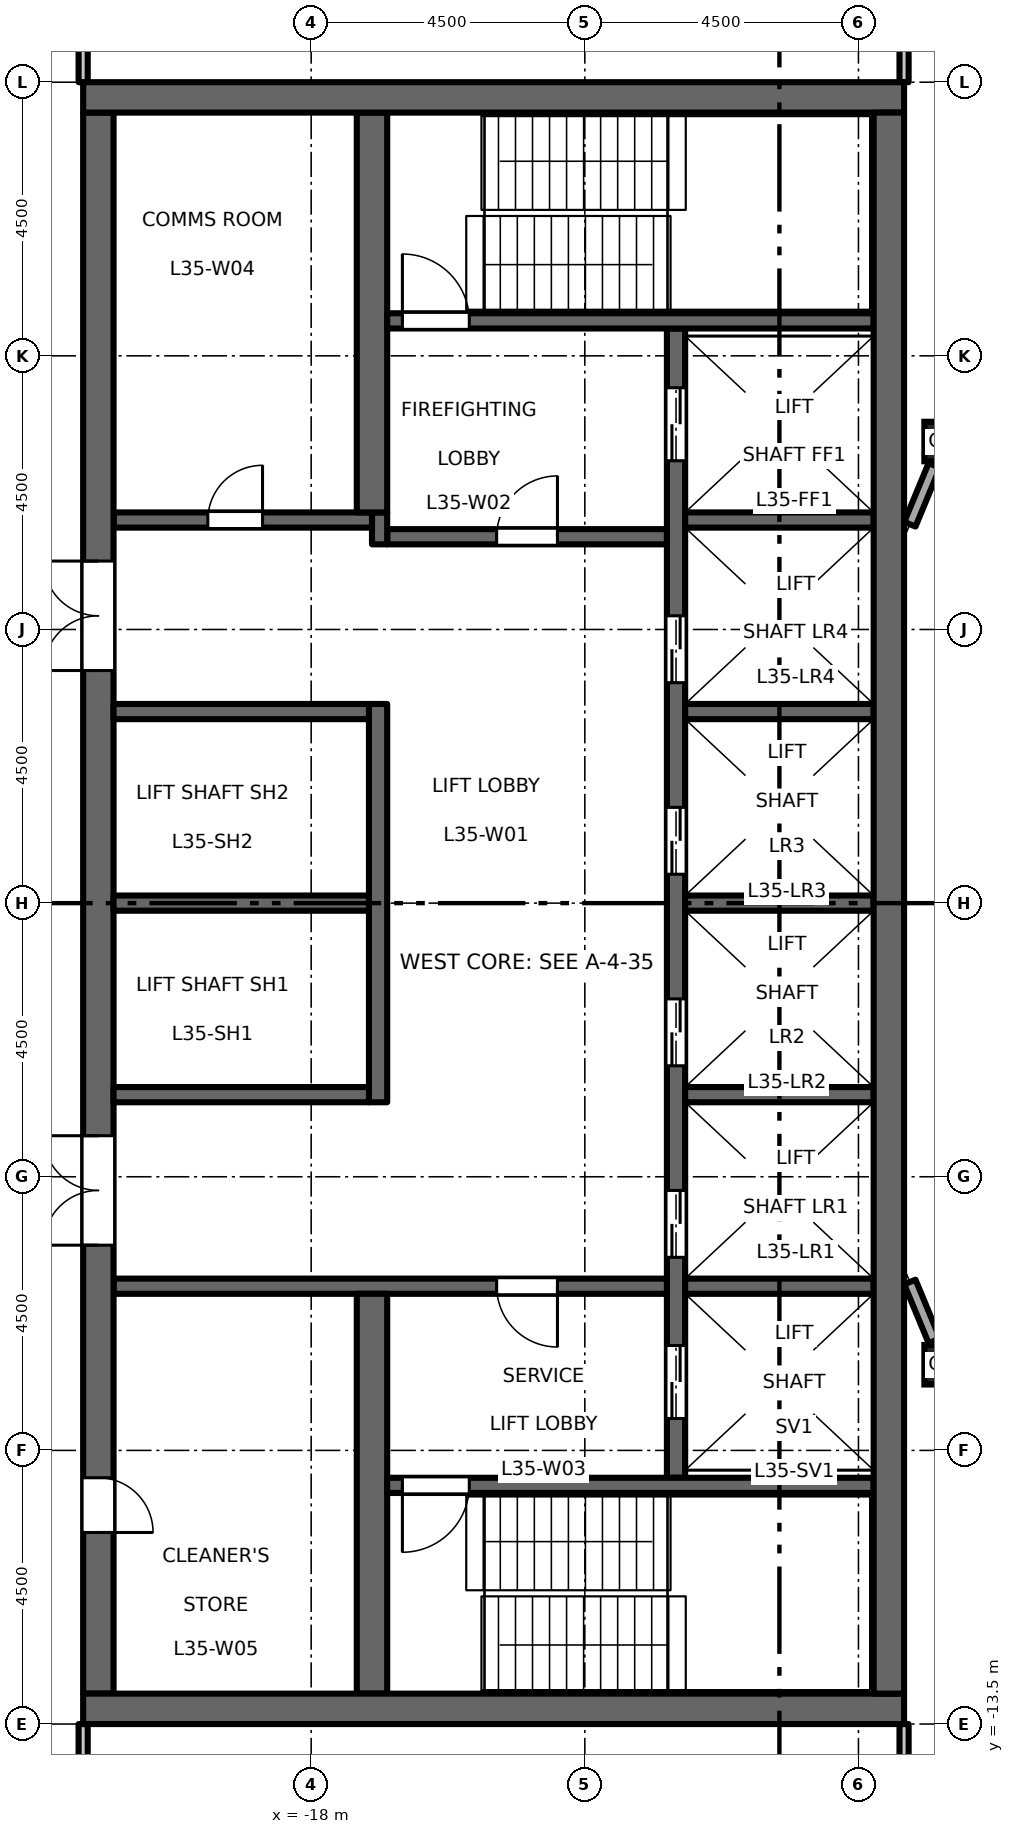
"""IFC4 building model, lengths in metres.
Left out: names, types, materials, properties, quantities, classifications, styles, units other than length and angle.
Written with IfcOpenShell. Run it as: python <this file> out.ifc"""

import sys

from ifc_helpers import new_model, si_unit, direction, frame, frame_2d, origin, origin_2d, place, context, subcontext, project, spatial, rectangle, hollow_rectangle, extrude, element, fill, save


model = new_model("IFC4")
c1 = context("Model", 3, precision=1e-05, world=origin(), true_north=direction((0.0, 1.0)))
c2 = subcontext(c1, "Body", "Model", "MODEL_VIEW")
j1 = project(units=[si_unit("LENGTHUNIT", "METRE"), si_unit("PLANEANGLEUNIT", "RADIAN")], contexts=[c1])
p1 = place(None, origin())
s1 = spatial("IfcSite", under=j1, at=p1, CompositionType="ELEMENT")
p2 = place(p1, origin())
s2 = spatial("IfcBuilding", under=s1, at=p2, CompositionType="ELEMENT")
p3 = place(p2, frame((0.0, 0.0, 163.2)))
s3 = spatial("IfcBuildingStorey", under=s2, at=p3, CompositionType="ELEMENT", Elevation=163.2)
for number, where, z_axis, x_axis in (
    (1, (-7.591, -7.591, 0.0), (0.0, 0.0, 1.0), (1.0, 0.0, 0.0)),
    (2, (-7.591, 7.591, 0.0), (0.0, 0.0, 1.0), (1.0, 0.0, 0.0)),
):
    element("IfcColumn", number, at=place(p3, frame(where, z_axis=z_axis, x_axis=x_axis)), inside=s3, PredefinedType="COLUMN", context=c2, shape_type="SweptSolid", body=[
        extrude(hollow_rectangle(XDim=0.65, YDim=0.65, WallThickness=0.036, at=origin_2d()), origin(), (0.0, 0.0, 1.0), 4.5),
    ])
p4 = place(p3, frame((-12.0, -9.45, 0.0), z_axis=(0.0, 0.0, 1.0), x_axis=(0.0, 1.0, 0.0)))
e3 = element("IfcWall", 3, at=p4, inside=s3, PredefinedType="SHEAR", context=c2, shape_type="SweptSolid", body=[
    extrude(rectangle(XDim=18.9, YDim=0.3, at=frame_2d((9.45, 0.0))), origin(), (0.0, 0.0, 1.0), 4.35),
])
p5 = place(p4, frame((3.625, 0.0, 0.0)))
e4 = element("IfcOpeningElement", 4, at=p5, cuts=e3, PredefinedType="OPENING", context=c2, shape_type="SweptSolid", body=[
    extrude(rectangle(XDim=1.1, YDim=2.1, at=frame_2d((0.55, 1.05))), frame((0.0, 0.16, 0.0), z_axis=(0.0, -1.0, 0.0), x_axis=(1.0, 0.0, 0.0)), (0.0, 0.0, 1.0), 0.32),
])
p6 = place(p4, frame((6.775, 0.0, 0.0)))
e5 = element("IfcOpeningElement", 5, at=p6, cuts=e3, PredefinedType="OPENING", context=c2, shape_type="SweptSolid", body=[
    extrude(rectangle(XDim=1.1, YDim=2.1, at=frame_2d((0.55, 1.05))), frame((0.0, 0.16, 0.0), z_axis=(0.0, -1.0, 0.0), x_axis=(1.0, 0.0, 0.0)), (0.0, 0.0, 1.0), 0.32),
])
p7 = place(p4, frame((9.925, 0.0, 0.0)))
e6 = element("IfcOpeningElement", 6, at=p7, cuts=e3, PredefinedType="OPENING", context=c2, shape_type="SweptSolid", body=[
    extrude(rectangle(XDim=1.1, YDim=2.1, at=frame_2d((0.55, 1.05))), frame((0.0, 0.16, 0.0), z_axis=(0.0, -1.0, 0.0), x_axis=(1.0, 0.0, 0.0)), (0.0, 0.0, 1.0), 0.32),
])
p8 = place(p4, frame((13.075, 0.0, 0.0)))
e7 = element("IfcOpeningElement", 7, at=p8, cuts=e3, PredefinedType="OPENING", context=c2, shape_type="SweptSolid", body=[
    extrude(rectangle(XDim=1.1, YDim=2.1, at=frame_2d((0.55, 1.05))), frame((0.0, 0.16, 0.0), z_axis=(0.0, -1.0, 0.0), x_axis=(1.0, 0.0, 0.0)), (0.0, 0.0, 1.0), 0.32),
])
p9 = place(p4, frame((16.725, 0.0, 0.0)))
e8 = element("IfcOpeningElement", 8, at=p9, cuts=e3, PredefinedType="OPENING", context=c2, shape_type="SweptSolid", body=[
    extrude(rectangle(XDim=1.2, YDim=2.1, at=frame_2d((0.6, 1.05))), frame((0.0, 0.16, 0.0), z_axis=(0.0, -1.0, 0.0), x_axis=(1.0, 0.0, 0.0)), (0.0, 0.0, 1.0), 0.32),
])
p10 = place(p4, frame((0.975, 0.0, 0.0)))
e9 = element("IfcOpeningElement", 9, at=p10, cuts=e3, PredefinedType="OPENING", context=c2, shape_type="SweptSolid", body=[
    extrude(rectangle(XDim=1.2, YDim=2.1, at=frame_2d((0.6, 1.05))), frame((0.0, 0.16, 0.0), z_axis=(0.0, -1.0, 0.0), x_axis=(1.0, 0.0, 0.0)), (0.0, 0.0, 1.0), 0.32),
])
p11 = place(p3, frame((-12.15, 6.025, 0.0), z_axis=(0.0, 0.0, 1.0), x_axis=(-1.0, 0.0, 0.0)))
e10 = element("IfcWall", 10, at=p11, inside=s3, PredefinedType="SHEAR", context=c2, shape_type="SweptSolid", body=[
    extrude(rectangle(XDim=4.6, YDim=0.25, at=frame_2d((2.3, 0.0))), origin(), (0.0, 0.0, 1.0), 4.35),
])
p12 = place(p11, frame((1.8, 0.0, 0.0)))
e11 = element("IfcOpeningElement", 11, at=p12, cuts=e10, PredefinedType="OPENING", context=c2, shape_type="SweptSolid", body=[
    extrude(rectangle(XDim=1.0, YDim=2.1, at=frame_2d((0.5, 1.05))), frame((0.0, 0.135, 0.0), z_axis=(0.0, -1.0, 0.0), x_axis=(1.0, 0.0, 0.0)), (0.0, 0.0, 1.0), 0.27),
])
p13 = place(p3, frame((-16.875, 5.9, 0.0), z_axis=(0.0, 0.0, 1.0), x_axis=(0.0, 1.0, 0.0)))
e12 = element("IfcWall", 12, at=p13, inside=s3, PredefinedType="SHEAR", context=c2, shape_type="SweptSolid", body=[
    extrude(rectangle(XDim=0.525, YDim=0.25, at=frame_2d((0.263, 0.0))), origin(), (0.0, 0.0, 1.0), 4.35),
])
p14 = place(p3, frame((-17.0, 6.3, 0.0), z_axis=(0.0, 0.0, 1.0), x_axis=(-1.0, 0.0, 0.0)))
e13 = element("IfcWall", 13, at=p14, inside=s3, PredefinedType="SHEAR", context=c2, shape_type="SweptSolid", body=[
    extrude(rectangle(XDim=4.25, YDim=0.25, at=frame_2d((2.125, 0.0))), origin(), (0.0, 0.0, 1.0), 4.35),
])
p15 = place(p14, frame((1.8, 0.0, 0.0)))
e14 = element("IfcOpeningElement", 14, at=p15, cuts=e13, PredefinedType="OPENING", context=c2, shape_type="SweptSolid", body=[
    extrude(rectangle(XDim=0.9, YDim=2.1, at=frame_2d((0.45, 1.05))), frame((0.0, 0.135, 0.0), z_axis=(0.0, -1.0, 0.0), x_axis=(1.0, 0.0, 0.0)), (0.0, 0.0, 1.0), 0.27),
])
p16 = place(p3, frame((-12.15, -6.3, 0.0), z_axis=(0.0, 0.0, 1.0), x_axis=(-1.0, 0.0, 0.0)))
e15 = element("IfcWall", 15, at=p16, inside=s3, PredefinedType="SHEAR", context=c2, shape_type="SweptSolid", body=[
    extrude(rectangle(XDim=9.1, YDim=0.25, at=frame_2d((4.55, 0.0))), origin(), (0.0, 0.0, 1.0), 4.35),
])
p17 = place(p16, frame((1.8, 0.0, 0.0)))
e16 = element("IfcOpeningElement", 16, at=p17, cuts=e15, PredefinedType="OPENING", context=c2, shape_type="SweptSolid", body=[
    extrude(rectangle(XDim=1.0, YDim=2.1, at=frame_2d((0.5, 1.05))), frame((0.0, 0.135, 0.0), z_axis=(0.0, -1.0, 0.0), x_axis=(1.0, 0.0, 0.0)), (0.0, 0.0, 1.0), 0.27),
])
p18 = place(p3, frame((-21.5, -13.0, 0.0), z_axis=(0.0, 0.0, 1.0), x_axis=(0.0, 1.0, 0.0)))
e17 = element("IfcWall", 17, at=p18, inside=s3, PredefinedType="SHEAR", context=c2, shape_type="SweptSolid", body=[
    extrude(rectangle(XDim=26.0, YDim=0.5, at=frame_2d((13.0, 0.0))), origin(), (0.0, 0.0, 1.0), 4.35),
])
p19 = place(p18, frame((16.825, 0.0, 0.0)))
e18 = element("IfcOpeningElement", 18, at=p19, cuts=e17, PredefinedType="OPENING", context=c2, shape_type="SweptSolid", body=[
    extrude(rectangle(XDim=1.8, YDim=2.1, at=frame_2d((0.9, 1.05))), frame((0.0, 0.26, 0.0), z_axis=(0.0, -1.0, 0.0), x_axis=(1.0, 0.0, 0.0)), (0.0, 0.0, 1.0), 0.52),
])
p20 = place(p18, frame((7.375, 0.0, 0.0)))
e19 = element("IfcOpeningElement", 19, at=p20, cuts=e17, PredefinedType="OPENING", context=c2, shape_type="SweptSolid", body=[
    extrude(rectangle(XDim=1.8, YDim=2.1, at=frame_2d((0.9, 1.05))), frame((0.0, 0.26, 0.0), z_axis=(0.0, -1.0, 0.0), x_axis=(1.0, 0.0, 0.0)), (0.0, 0.0, 1.0), 0.52),
])
p21 = place(p18, frame((2.65, 0.0, 0.0)))
e20 = element("IfcOpeningElement", 20, at=p21, cuts=e17, PredefinedType="OPENING", context=c2, shape_type="SweptSolid", body=[
    extrude(rectangle(XDim=0.9, YDim=2.1, at=frame_2d((0.45, 1.05))), frame((0.0, 0.26, 0.0), z_axis=(0.0, -1.0, 0.0), x_axis=(1.0, 0.0, 0.0)), (0.0, 0.0, 1.0), 0.52),
])
p22 = place(p3, frame((-16.9, -3.275, 0.0), z_axis=(0.0, 0.0, 1.0), x_axis=(0.0, 1.0, 0.0)))
e21 = element("IfcWall", 21, at=p22, inside=s3, PredefinedType="SHEAR", context=c2, shape_type="SweptSolid", body=[
    extrude(rectangle(XDim=6.55, YDim=0.3, at=frame_2d((3.275, 0.0))), origin(), (0.0, 0.0, 1.0), 4.35),
])
for number, where, z_axis, x_axis in (
    (22, (-17.05, 0.0, 0.0), (0.0, 0.0, 1.0), (-1.0, 0.0, 0.0)),
    (23, (-17.05, 3.15, 0.0), (0.0, 0.0, 1.0), (-1.0, 0.0, 0.0)),
    (24, (-17.05, -3.15, 0.0), (0.0, 0.0, 1.0), (-1.0, 0.0, 0.0)),
):
    element("IfcWall", number, at=place(p3, frame(where, z_axis=z_axis, x_axis=x_axis)), inside=s3, PredefinedType="SHEAR", context=c2, shape_type="SweptSolid", body=[
        extrude(rectangle(XDim=4.2, YDim=0.25, at=frame_2d((2.1, 0.0))), origin(), (0.0, 0.0, 1.0), 4.35),
    ])
for number, where, z_axis, x_axis in (
    (25, (-17.0, 6.425, 0.0), (0.0, 0.0, 1.0), (0.0, 1.0, 0.0)),
    (26, (-17.0, -13.0, 0.0), (0.0, 0.0, 1.0), (0.0, 1.0, 0.0)),
):
    element("IfcWall", number, at=place(p3, frame(where, z_axis=z_axis, x_axis=x_axis)), inside=s3, PredefinedType="SHEAR", context=c2, shape_type="SweptSolid", body=[
        extrude(rectangle(XDim=6.575, YDim=0.5, at=frame_2d((3.288, 0.0))), origin(), (0.0, 0.0, 1.0), 4.35),
    ])
for number, where, z_axis, x_axis in (
    (27, (-8.75, 0.0, 0.0), (0.0, 0.0, 1.0), (-1.0, 0.0, 0.0)),
    (28, (-8.75, 3.15, 0.0), (0.0, 0.0, 1.0), (-1.0, 0.0, 0.0)),
    (29, (-8.75, 6.3, 0.0), (0.0, 0.0, 1.0), (-1.0, 0.0, 0.0)),
    (30, (-8.75, -3.15, 0.0), (0.0, 0.0, 1.0), (-1.0, 0.0, 0.0)),
    (31, (-8.75, -6.3, 0.0), (0.0, 0.0, 1.0), (-1.0, 0.0, 0.0)),
):
    element("IfcWall", number, at=place(p3, frame(where, z_axis=z_axis, x_axis=x_axis)), inside=s3, PredefinedType="SHEAR", context=c2, shape_type="SweptSolid", body=[
        extrude(rectangle(XDim=3.1, YDim=0.25, at=frame_2d((1.55, 0.0))), origin(), (0.0, 0.0, 1.0), 4.35),
    ])
p23 = place(p3, frame((-8.75, 9.575, 0.0), z_axis=(0.0, 0.0, 1.0), x_axis=(-1.0, 0.0, 0.0)))
e32 = element("IfcWall", 32, at=p23, inside=s3, PredefinedType="SHEAR", context=c2, shape_type="SweptSolid", body=[
    extrude(rectangle(XDim=8.0, YDim=0.25, at=frame_2d((4.0, 0.0))), origin(), (0.0, 0.0, 1.0), 4.35),
])
p24 = place(p23, frame((6.65, 0.0, 0.0)))
e33 = element("IfcOpeningElement", 33, at=p24, cuts=e32, PredefinedType="OPENING", context=c2, shape_type="SweptSolid", body=[
    extrude(rectangle(XDim=1.1, YDim=2.1, at=frame_2d((0.55, 1.05))), frame((0.0, 0.135, 0.0), z_axis=(0.0, -1.0, 0.0), x_axis=(1.0, 0.0, 0.0)), (0.0, 0.0, 1.0), 0.27),
])
p25 = place(p3, frame((-8.75, -9.575, 0.0), z_axis=(0.0, 0.0, 1.0), x_axis=(-1.0, 0.0, 0.0)))
e34 = element("IfcWall", 34, at=p25, inside=s3, PredefinedType="SHEAR", context=c2, shape_type="SweptSolid", body=[
    extrude(rectangle(XDim=8.0, YDim=0.25, at=frame_2d((4.0, 0.0))), origin(), (0.0, 0.0, 1.0), 4.35),
])
p26 = place(p25, frame((6.65, 0.0, 0.0)))
e35 = element("IfcOpeningElement", 35, at=p26, cuts=e34, PredefinedType="OPENING", context=c2, shape_type="SweptSolid", body=[
    extrude(rectangle(XDim=1.1, YDim=2.1, at=frame_2d((0.55, 1.05))), frame((0.0, 0.135, 0.0), z_axis=(0.0, -1.0, 0.0), x_axis=(1.0, 0.0, 0.0)), (0.0, 0.0, 1.0), 0.27),
])
for number, where, z_axis, x_axis in (
    (36, (-8.25, 13.25, 0.0), (0.0, 0.0, 1.0), (-1.0, 0.0, 0.0)),
    (37, (-8.25, -13.25, 0.0), (0.0, 0.0, 1.0), (-1.0, 0.0, 0.0)),
):
    element("IfcWall", number, at=place(p3, frame(where, z_axis=z_axis, x_axis=x_axis)), inside=s3, PredefinedType="SHEAR", context=c2, shape_type="SweptSolid", body=[
        extrude(rectangle(XDim=13.5, YDim=0.5, at=frame_2d((6.75, 0.0))), origin(), (0.0, 0.0, 1.0), 4.35),
    ])
p27 = place(p3, frame((-8.5, -13.0, 0.0), z_axis=(0.0, 0.0, 1.0), x_axis=(0.0, 1.0, 0.0)))
e38 = element("IfcWall", 38, at=p27, inside=s3, PredefinedType="SHEAR", context=c2, shape_type="SweptSolid", body=[
    extrude(rectangle(XDim=26.0, YDim=0.5, at=frame_2d((13.0, 0.0))), origin(), (0.0, 0.0, 1.0), 4.35),
])
for number, where, z_axis, x_axis in (
    (39, (-7.753, 7.199, 0.0), (0.0, 0.0, 1.0), (-0.383, -0.924, 0.0)),
    (40, (-8.154, -6.231, 0.0), (0.0, 0.0, 1.0), (0.383, -0.924, 0.0)),
):
    element("IfcWall", number, at=place(p3, frame(where, z_axis=z_axis, x_axis=x_axis)), inside=s3, PredefinedType="STANDARD", context=c2, shape_type="SweptSolid", body=[
        extrude(rectangle(XDim=1.048, YDim=0.2, at=frame_2d((0.524, 0.0))), origin(), (0.0, 0.0, 1.0), 3.826),
    ])
for number, where, z_axis, x_axis in (
    (41, (-21.75, -17.925, 0.0), (0.0, 0.0, 1.0), (0.0, 1.0, 0.0)),
    (42, (-21.75, 13.5, 0.0), (0.0, 0.0, 1.0), (0.0, 1.0, 0.0)),
    (43, (-8.25, -17.925, 0.0), (0.0, 0.0, 1.0), (0.0, 1.0, 0.0)),
    (44, (-8.25, 13.5, 0.0), (0.0, 0.0, 1.0), (0.0, 1.0, 0.0)),
):
    element("IfcWall", number, at=place(p3, frame(where, z_axis=z_axis, x_axis=x_axis)), inside=s3, PredefinedType="PARTITIONING", context=c2, shape_type="SweptSolid", body=[
        extrude(rectangle(XDim=4.425, YDim=0.15, at=frame_2d((2.212, 0.0))), origin(), (0.0, 0.0, 1.0), 4.35),
    ])
p28 = place(p12, origin())
e45 = element("IfcDoor", 45, at=p28, inside=s3, OperationType="SINGLE_SWING_LEFT", PredefinedType="DOOR", context=c2, shape_type="SweptSolid", body=[
    extrude(rectangle(XDim=1.0, YDim=2.1, at=frame_2d((0.5, 1.05))), frame((0.0, 0.025, 0.0), z_axis=(0.0, -1.0, 0.0), x_axis=(1.0, 0.0, 0.0)), (0.0, 0.0, 1.0), 0.05),
])
fill(e11, e45)
p29 = place(p17, origin())
e46 = element("IfcDoor", 46, at=p29, inside=s3, OperationType="SINGLE_SWING_RIGHT", PredefinedType="DOOR", context=c2, shape_type="SweptSolid", body=[
    extrude(rectangle(XDim=1.0, YDim=2.1, at=frame_2d((0.5, 1.05))), frame((0.0, 0.025, 0.0), z_axis=(0.0, -1.0, 0.0), x_axis=(1.0, 0.0, 0.0)), (0.0, 0.0, 1.0), 0.05),
])
fill(e16, e46)
p30 = place(p24, origin())
e47 = element("IfcDoor", 47, at=p30, inside=s3, OperationType="SINGLE_SWING_RIGHT", PredefinedType="DOOR", context=c2, shape_type="SweptSolid", body=[
    extrude(rectangle(XDim=1.1, YDim=2.1, at=frame_2d((0.55, 1.05))), frame((0.0, 0.025, 0.0), z_axis=(0.0, -1.0, 0.0), x_axis=(1.0, 0.0, 0.0)), (0.0, 0.0, 1.0), 0.05),
])
fill(e33, e47)
p31 = place(p26, origin())
e48 = element("IfcDoor", 48, at=p31, inside=s3, OperationType="SINGLE_SWING_LEFT", PredefinedType="DOOR", context=c2, shape_type="SweptSolid", body=[
    extrude(rectangle(XDim=1.1, YDim=2.1, at=frame_2d((0.55, 1.05))), frame((0.0, 0.025, 0.0), z_axis=(0.0, -1.0, 0.0), x_axis=(1.0, 0.0, 0.0)), (0.0, 0.0, 1.0), 0.05),
])
fill(e35, e48)
p32 = place(p19, origin())
e49 = element("IfcDoor", 49, at=p32, inside=s3, OperationType="DOUBLE_DOOR_DOUBLE_SWING", PredefinedType="DOOR", context=c2, shape_type="SweptSolid", body=[
    extrude(rectangle(XDim=1.8, YDim=2.1, at=frame_2d((0.9, 1.05))), frame((0.0, 0.025, 0.0), z_axis=(0.0, -1.0, 0.0), x_axis=(1.0, 0.0, 0.0)), (0.0, 0.0, 1.0), 0.05),
])
fill(e18, e49)
p33 = place(p20, origin())
e50 = element("IfcDoor", 50, at=p33, inside=s3, OperationType="DOUBLE_DOOR_DOUBLE_SWING", PredefinedType="DOOR", context=c2, shape_type="SweptSolid", body=[
    extrude(rectangle(XDim=1.8, YDim=2.1, at=frame_2d((0.9, 1.05))), frame((0.0, 0.025, 0.0), z_axis=(0.0, -1.0, 0.0), x_axis=(1.0, 0.0, 0.0)), (0.0, 0.0, 1.0), 0.05),
])
fill(e19, e50)
p34 = place(p5, origin())
e51 = element("IfcDoor", 51, at=p34, inside=s3, OperationType="DOUBLE_DOOR_SLIDING", PredefinedType="DOOR", context=c2, shape_type="SweptSolid", body=[
    extrude(rectangle(XDim=1.1, YDim=2.1, at=frame_2d((0.55, 1.05))), frame((0.0, 0.025, 0.0), z_axis=(0.0, -1.0, 0.0), x_axis=(1.0, 0.0, 0.0)), (0.0, 0.0, 1.0), 0.05),
])
fill(e4, e51)
p35 = place(p6, origin())
e52 = element("IfcDoor", 52, at=p35, inside=s3, OperationType="DOUBLE_DOOR_SLIDING", PredefinedType="DOOR", context=c2, shape_type="SweptSolid", body=[
    extrude(rectangle(XDim=1.1, YDim=2.1, at=frame_2d((0.55, 1.05))), frame((0.0, 0.025, 0.0), z_axis=(0.0, -1.0, 0.0), x_axis=(1.0, 0.0, 0.0)), (0.0, 0.0, 1.0), 0.05),
])
fill(e5, e52)
p36 = place(p7, origin())
e53 = element("IfcDoor", 53, at=p36, inside=s3, OperationType="DOUBLE_DOOR_SLIDING", PredefinedType="DOOR", context=c2, shape_type="SweptSolid", body=[
    extrude(rectangle(XDim=1.1, YDim=2.1, at=frame_2d((0.55, 1.05))), frame((0.0, 0.025, 0.0), z_axis=(0.0, -1.0, 0.0), x_axis=(1.0, 0.0, 0.0)), (0.0, 0.0, 1.0), 0.05),
])
fill(e6, e53)
p37 = place(p8, origin())
e54 = element("IfcDoor", 54, at=p37, inside=s3, OperationType="DOUBLE_DOOR_SLIDING", PredefinedType="DOOR", context=c2, shape_type="SweptSolid", body=[
    extrude(rectangle(XDim=1.1, YDim=2.1, at=frame_2d((0.55, 1.05))), frame((0.0, 0.025, 0.0), z_axis=(0.0, -1.0, 0.0), x_axis=(1.0, 0.0, 0.0)), (0.0, 0.0, 1.0), 0.05),
])
fill(e7, e54)
p38 = place(p9, origin())
e55 = element("IfcDoor", 55, at=p38, inside=s3, OperationType="DOUBLE_DOOR_SLIDING", PredefinedType="DOOR", context=c2, shape_type="SweptSolid", body=[
    extrude(rectangle(XDim=1.2, YDim=2.1, at=frame_2d((0.6, 1.05))), frame((0.0, 0.025, 0.0), z_axis=(0.0, -1.0, 0.0), x_axis=(1.0, 0.0, 0.0)), (0.0, 0.0, 1.0), 0.05),
])
fill(e8, e55)
p39 = place(p10, origin())
e56 = element("IfcDoor", 56, at=p39, inside=s3, OperationType="DOUBLE_DOOR_SLIDING", PredefinedType="DOOR", context=c2, shape_type="SweptSolid", body=[
    extrude(rectangle(XDim=1.2, YDim=2.1, at=frame_2d((0.6, 1.05))), frame((0.0, 0.025, 0.0), z_axis=(0.0, -1.0, 0.0), x_axis=(1.0, 0.0, 0.0)), (0.0, 0.0, 1.0), 0.05),
])
fill(e9, e56)
p40 = place(p15, origin())
e57 = element("IfcDoor", 57, at=p40, inside=s3, OperationType="SINGLE_SWING_LEFT", PredefinedType="DOOR", context=c2, shape_type="SweptSolid", body=[
    extrude(rectangle(XDim=0.9, YDim=2.1, at=frame_2d((0.45, 1.05))), frame((0.0, 0.025, 0.0), z_axis=(0.0, -1.0, 0.0), x_axis=(1.0, 0.0, 0.0)), (0.0, 0.0, 1.0), 0.05),
])
fill(e14, e57)
p41 = place(p21, origin())
e58 = element("IfcDoor", 58, at=p41, inside=s3, OperationType="SINGLE_SWING_LEFT", PredefinedType="DOOR", context=c2, shape_type="SweptSolid", body=[
    extrude(rectangle(XDim=0.9, YDim=2.1, at=frame_2d((0.45, 1.05))), frame((0.0, 0.025, 0.0), z_axis=(0.0, -1.0, 0.0), x_axis=(1.0, 0.0, 0.0)), (0.0, 0.0, 1.0), 0.05),
])
fill(e20, e58)
save(model, sys.argv[1])
